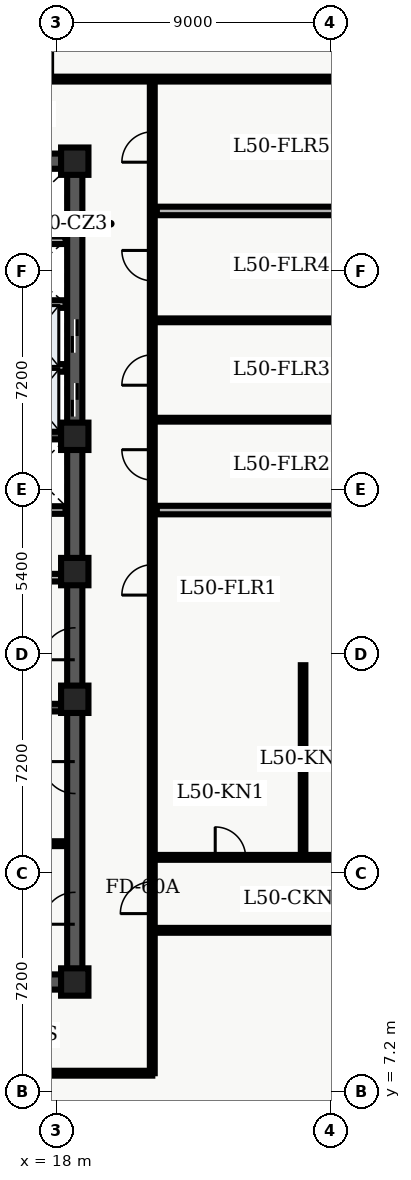
"""IFC4 building model, lengths in metres.
Left out: names, types, materials, properties, quantities, classifications, styles, units other than length and angle.
Written with IfcOpenShell. Run it as: python <this file> out.ifc"""

import sys

from ifc_helpers import new_model, entity, si_unit, converted_unit, direction, frame, origin_with_axes, origin_2d_with_axis, place, context, subcontext, project, spatial, polyline, rectangle, outline, extrude, element, fill, save


model = new_model("IFC4")
c1 = context("Model", 3, precision=1e-05, world=origin_with_axes(), true_north=direction((0.0, 1.0)))
c2 = subcontext(c1, "Body", "Model", "MODEL_VIEW")
j1 = project(units=[si_unit("LENGTHUNIT", "METRE"), converted_unit("PLANEANGLEUNIT", "DEGREE", entity("IfcPlaneAngleMeasure", 0.017), si_unit("PLANEANGLEUNIT", "RADIAN"), dimensions=[0, 0, 0, 0, 0, 0, 0])], contexts=[c1])
p1 = place(None, origin_with_axes())
s1 = spatial("IfcSite", under=j1, at=p1, CompositionType="ELEMENT")
p2 = place(p1, origin_with_axes())
s2 = spatial("IfcBuilding", under=s1, at=p2, CompositionType="ELEMENT")
p3 = place(p2, frame((0.0, 0.0, 204.3), z_axis=(0.0, 0.0, 1.0), x_axis=(1.0, 0.0, 0.0)))
s3 = spatial("IfcBuildingStorey", under=s2, at=p3, CompositionType="ELEMENT", Elevation=204.3)
p4 = place(p3, frame((11.4, 10.8, 0.0), z_axis=(0.0, 0.0, 1.0), x_axis=(1.0, 0.0, 0.0)))
e1 = element("IfcWall", 1, at=p4, inside=s3, PredefinedType="SHEAR", context=c2, shape_type="SweptSolid", body=[
    extrude(outline(polyline([(0.0, -0.25), (7.2, -0.25), (7.2, 0.25), (0.0, 0.25), (0.0, -0.25)])), origin_with_axes(), (0.0, 0.0, 1.0), 3.66),
])
p5 = place(p4, frame((2.625, 0.0, 0.0), z_axis=(0.0, 0.0, 1.0), x_axis=(1.0, 0.0, 0.0)))
e2 = element("IfcOpeningElement", 2, at=p5, cuts=e1, PredefinedType="OPENING", context=c2, shape_type="SweptSolid", body=[
    extrude(rectangle(XDim=1.05, YDim=0.52, at=origin_2d_with_axis()), origin_with_axes(), (0.0, 0.0, 1.0), 2.15),
])
p6 = place(p3, frame((11.4, 37.8, 0.0), z_axis=(0.0, 0.0, 1.0), x_axis=(1.0, 0.0, 0.0)))
e3 = element("IfcWall", 3, at=p6, inside=s3, PredefinedType="SHEAR", context=c2, shape_type="SweptSolid", body=[
    extrude(outline(polyline([(0.0, -0.25), (7.2, -0.25), (7.2, 0.25), (0.0, 0.25), (0.0, -0.25)])), origin_with_axes(), (0.0, 0.0, 1.0), 3.66),
])
p7 = place(p6, frame((2.625, 0.0, 0.0), z_axis=(0.0, 0.0, 1.0), x_axis=(1.0, 0.0, 0.0)))
e4 = element("IfcOpeningElement", 4, at=p7, cuts=e3, PredefinedType="OPENING", context=c2, shape_type="SweptSolid", body=[
    extrude(rectangle(XDim=1.05, YDim=0.52, at=origin_2d_with_axis()), origin_with_axes(), (0.0, 0.0, 1.0), 2.15),
])
p8 = place(p3, frame((18.6, 10.8, 0.0), z_axis=(0.0, 0.0, 1.0), x_axis=(0.0, 1.0, 0.0)))
e5 = element("IfcWall", 5, at=p8, inside=s3, PredefinedType="SHEAR", context=c2, shape_type="SweptSolid", body=[
    extrude(outline(polyline([(0.0, -0.25), (13.5, -0.25), (13.5, 0.25), (0.0, 0.25), (0.0, -0.25)])), origin_with_axes(), (0.0, 0.0, 1.0), 3.66),
])
p9 = place(p8, frame((11.125, 0.0, 0.0), z_axis=(0.0, 0.0, 1.0), x_axis=(1.0, 0.0, 0.0)))
e6 = element("IfcOpeningElement", 6, at=p9, cuts=e5, PredefinedType="OPENING", context=c2, shape_type="SweptSolid", body=[
    extrude(rectangle(XDim=1.05, YDim=0.52, at=origin_2d_with_axis()), origin_with_axes(), (0.0, 0.0, 1.0), 2.15),
])
p10 = place(p8, frame((2.425, 0.0, 0.0), z_axis=(0.0, 0.0, 1.0), x_axis=(1.0, 0.0, 0.0)))
e7 = element("IfcOpeningElement", 7, at=p10, cuts=e5, PredefinedType="OPENING", context=c2, shape_type="SweptSolid", body=[
    extrude(rectangle(XDim=1.05, YDim=0.52, at=origin_2d_with_axis()), origin_with_axes(), (0.0, 0.0, 1.0), 2.15),
])
p11 = place(p8, frame((6.725, 0.0, 0.0), z_axis=(0.0, 0.0, 1.0), x_axis=(1.0, 0.0, 0.0)))
e8 = element("IfcOpeningElement", 8, at=p11, cuts=e5, PredefinedType="OPENING", context=c2, shape_type="SweptSolid", body=[
    extrude(rectangle(XDim=1.05, YDim=0.52, at=origin_2d_with_axis()), origin_with_axes(), (0.0, 0.0, 1.0), 2.15),
])
p12 = place(p3, frame((18.6, 24.3, 0.0), z_axis=(0.0, 0.0, 1.0), x_axis=(0.0, 1.0, 0.0)))
e9 = element("IfcWall", 9, at=p12, inside=s3, PredefinedType="SHEAR", context=c2, shape_type="SweptSolid", body=[
    extrude(outline(polyline([(0.0, -0.25), (13.5, -0.25), (13.5, 0.25), (0.0, 0.25), (0.0, -0.25)])), origin_with_axes(), (0.0, 0.0, 1.0), 3.66),
])
p13 = place(p12, frame((5.65, 0.0, 0.0), z_axis=(0.0, 0.0, 1.0), x_axis=(1.0, 0.0, 0.0)))
e10 = element("IfcOpeningElement", 10, at=p13, cuts=e9, PredefinedType="OPENING", context=c2, shape_type="SweptSolid", body=[
    extrude(rectangle(XDim=1.1, YDim=0.52, at=origin_2d_with_axis()), origin_with_axes(), (0.0, 0.0, 1.0), 2.15),
])
p14 = place(p12, frame((7.75, 0.0, 0.0), z_axis=(0.0, 0.0, 1.0), x_axis=(1.0, 0.0, 0.0)))
e11 = element("IfcOpeningElement", 11, at=p14, cuts=e9, PredefinedType="OPENING", context=c2, shape_type="SweptSolid", body=[
    extrude(rectangle(XDim=1.1, YDim=0.52, at=origin_2d_with_axis()), origin_with_axes(), (0.0, 0.0, 1.0), 2.15),
])
for number, where, z_axis, x_axis in (
    (12, (11.65, 19.825, 0.0), (0.0, 0.0, 1.0), (1.0, 0.0, 0.0)),
    (13, (11.65, 28.775, 0.0), (0.0, 0.0, 1.0), (1.0, 0.0, 0.0)),
):
    element("IfcWall", number, at=place(p3, frame(where, z_axis=z_axis, x_axis=x_axis)), inside=s3, PredefinedType="SHEAR", context=c2, shape_type="SweptSolid", body=[
        extrude(outline(polyline([(0.0, -0.125), (6.7, -0.125), (6.7, 0.125), (0.0, 0.125), (0.0, -0.125)])), origin_with_axes(), (0.0, 0.0, 1.0), 3.66),
    ])
p15 = place(p3, frame((11.7, 24.1, 0.0), z_axis=(0.0, 0.0, 1.0), x_axis=(1.0, 0.0, 0.0)))
e14 = element("IfcWall", 14, at=p15, inside=s3, PredefinedType="SOLIDWALL", context=c2, shape_type="SweptSolid", body=[
    extrude(outline(polyline([(0.0, -0.125), (6.6, -0.125), (6.6, 0.125), (0.0, 0.125), (0.0, -0.125)])), origin_with_axes(), (0.0, 0.0, 1.0), 2.7),
])
p16 = place(p15, frame((3.6, 0.0, 0.0), z_axis=(0.0, 0.0, 1.0), x_axis=(1.0, 0.0, 0.0)))
e15 = element("IfcOpeningElement", 15, at=p16, cuts=e14, PredefinedType="OPENING", context=c2, shape_type="SweptSolid", body=[
    extrude(rectangle(XDim=0.9, YDim=0.27, at=origin_2d_with_axis()), origin_with_axes(), (0.0, 0.0, 1.0), 2.15),
])
p17 = place(p15, frame((5.65, 0.0, 0.0), z_axis=(0.0, 0.0, 1.0), x_axis=(1.0, 0.0, 0.0)))
e16 = element("IfcOpeningElement", 16, at=p17, cuts=e14, PredefinedType="OPENING", context=c2, shape_type="SweptSolid", body=[
    extrude(rectangle(XDim=0.9, YDim=0.27, at=origin_2d_with_axis()), origin_with_axes(), (0.0, 0.0, 1.0), 2.15),
])
p18 = place(p3, frame((11.7, 26.325, 0.0), z_axis=(0.0, 0.0, 1.0), x_axis=(1.0, 0.0, 0.0)))
e17 = element("IfcWall", 17, at=p18, inside=s3, PredefinedType="SOLIDWALL", context=c2, shape_type="SweptSolid", body=[
    extrude(outline(polyline([(0.0, -0.125), (6.6, -0.125), (6.6, 0.125), (0.0, 0.125), (0.0, -0.125)])), origin_with_axes(), (0.0, 0.0, 1.0), 2.7),
])
p19 = place(p18, frame((3.5, 0.0, 0.0), z_axis=(0.0, 0.0, 1.0), x_axis=(1.0, 0.0, 0.0)))
e18 = element("IfcOpeningElement", 18, at=p19, cuts=e17, PredefinedType="OPENING", context=c2, shape_type="SweptSolid", body=[
    extrude(rectangle(XDim=0.9, YDim=0.27, at=origin_2d_with_axis()), origin_with_axes(), (0.0, 0.0, 1.0), 2.15),
])
for number, where, z_axis, x_axis in (
    (19, (18.6, 10.8, 0.0), (0.0, 0.0, 1.0), (1.0, 0.0, 0.0)),
    (20, (18.6, 20.1, 0.0), (0.0, 0.0, 1.0), (1.0, 0.0, 0.0)),
    (21, (18.6, 24.3, 0.0), (0.0, 0.0, 1.0), (1.0, 0.0, 0.0)),
    (22, (18.6, 28.75, 0.0), (0.0, 0.0, 1.0), (1.0, 0.0, 0.0)),
    (23, (18.6, 37.8, 0.0), (0.0, 0.0, 1.0), (1.0, 0.0, 0.0)),
):
    element("IfcColumn", number, at=place(p3, frame(where, z_axis=z_axis, x_axis=x_axis)), inside=s3, PredefinedType="COLUMN", context=c2, shape_type="SweptSolid", body=[
        extrude(rectangle(XDim=0.9, YDim=0.9, at=origin_2d_with_axis()), origin_with_axes(), (0.0, 0.0, 1.0), 3.9),
    ])
p20 = place(p3, frame((15.84, 15.35, 0.0), z_axis=(0.0, 0.0, 1.0), x_axis=(1.0, 0.0, 0.0)))
e24 = element("IfcWall", 24, at=p20, inside=s3, PredefinedType="PARTITIONING", context=c2, shape_type="SweptSolid", body=[
    extrude(outline(polyline([(0.0, -0.08), (2.46, -0.08), (2.46, 0.08), (0.0, 0.08), (0.0, -0.08)])), origin_with_axes(), (0.0, 0.0, 1.0), 2.7),
])
for number, where, z_axis, x_axis in (
    (25, (15.84, 31.0, 0.0), (0.0, 0.0, 1.0), (1.0, 0.0, 0.0)),
    (26, (15.84, 33.1, 0.0), (0.0, 0.0, 1.0), (1.0, 0.0, 0.0)),
    (27, (15.84, 35.2, 0.0), (0.0, 0.0, 1.0), (1.0, 0.0, 0.0)),
):
    element("IfcWall", number, at=place(p3, frame(where, z_axis=z_axis, x_axis=x_axis)), inside=s3, PredefinedType="SOLIDWALL", context=c2, shape_type="SweptSolid", body=[
        extrude(outline(polyline([(0.0, -0.125), (2.46, -0.125), (2.46, 0.125), (0.0, 0.125), (0.0, -0.125)])), origin_with_axes(), (0.0, 0.0, 1.0), 2.7),
    ])
p21 = place(p3, frame((2.6, 7.8, 0.0), z_axis=(0.0, 0.0, 1.0), x_axis=(1.0, 0.0, 0.0)))
e28 = element("IfcWall", 28, at=p21, inside=s3, PredefinedType="PARTITIONING", context=c2, shape_type="SweptSolid", body=[
    extrude(outline(polyline([(0.0, -0.08), (18.55, -0.08), (18.55, 0.08), (0.0, 0.08), (0.0, -0.08)])), origin_with_axes(), (0.0, 0.0, 1.0), 2.7),
])
p22 = place(p21, frame((9.245, 0.0, 0.0), z_axis=(0.0, 0.0, 1.0), x_axis=(1.0, 0.0, 0.0)))
e29 = element("IfcOpeningElement", 29, at=p22, cuts=e28, PredefinedType="OPENING", context=c2, shape_type="SweptSolid", body=[
    extrude(rectangle(XDim=1.0, YDim=0.18, at=origin_2d_with_axis()), origin_with_axes(), (0.0, 0.0, 1.0), 2.15),
])
p23 = place(p3, frame((2.6, 40.5, 0.0), z_axis=(0.0, 0.0, 1.0), x_axis=(1.0, 0.0, 0.0)))
e30 = element("IfcWall", 30, at=p23, inside=s3, PredefinedType="PARTITIONING", context=c2, shape_type="SweptSolid", body=[
    extrude(outline(polyline([(0.0, -0.08), (26.946, -0.08), (26.946, 0.08), (0.0, 0.08), (0.0, -0.08)])), origin_with_axes(), (0.0, 0.0, 1.0), 2.7),
])
p24 = place(p23, frame((1.768, 0.0, 0.0), z_axis=(0.0, 0.0, 1.0), x_axis=(1.0, 0.0, 0.0)))
e31 = element("IfcOpeningElement", 31, at=p24, cuts=e30, PredefinedType="OPENING", context=c2, shape_type="SweptSolid", body=[
    extrude(rectangle(XDim=1.0, YDim=0.18, at=origin_2d_with_axis()), origin_with_axes(), (0.0, 0.0, 1.0), 2.15),
])
p25 = place(p23, frame((7.824, 0.0, 0.0), z_axis=(0.0, 0.0, 1.0), x_axis=(1.0, 0.0, 0.0)))
e32 = element("IfcOpeningElement", 32, at=p25, cuts=e30, PredefinedType="OPENING", context=c2, shape_type="SweptSolid", body=[
    extrude(rectangle(XDim=1.0, YDim=0.18, at=origin_2d_with_axis()), origin_with_axes(), (0.0, 0.0, 1.0), 2.15),
])
p26 = place(p23, frame((10.411, 0.0, 0.0), z_axis=(0.0, 0.0, 1.0), x_axis=(1.0, 0.0, 0.0)))
e33 = element("IfcOpeningElement", 33, at=p26, cuts=e30, PredefinedType="OPENING", context=c2, shape_type="SweptSolid", body=[
    extrude(rectangle(XDim=1.0, YDim=0.18, at=origin_2d_with_axis()), origin_with_axes(), (0.0, 0.0, 1.0), 2.15),
])
p27 = place(p23, frame((14.771, 0.0, 0.0), z_axis=(0.0, 0.0, 1.0), x_axis=(1.0, 0.0, 0.0)))
e34 = element("IfcOpeningElement", 34, at=p27, cuts=e30, PredefinedType="OPENING", context=c2, shape_type="SweptSolid", body=[
    extrude(rectangle(XDim=1.0, YDim=0.18, at=origin_2d_with_axis()), origin_with_axes(), (0.0, 0.0, 1.0), 2.15),
])
p28 = place(p3, frame((21.15, 7.8, 0.0), z_axis=(0.0, 0.0, 1.0), x_axis=(0.0, 1.0, 0.0)))
e35 = element("IfcWall", 35, at=p28, inside=s3, PredefinedType="PARTITIONING", context=c2, shape_type="SweptSolid", body=[
    extrude(outline(polyline([(0.0, -0.08), (32.7, -0.08), (32.7, 0.08), (0.0, 0.08), (0.0, -0.08)])), origin_with_axes(), (0.0, 0.0, 1.0), 2.7),
])
p29 = place(p28, frame((16.227, 0.0, 0.0), z_axis=(0.0, 0.0, 1.0), x_axis=(1.0, 0.0, 0.0)))
e36 = element("IfcOpeningElement", 36, at=p29, cuts=e35, PredefinedType="OPENING", context=c2, shape_type="SweptSolid", body=[
    extrude(rectangle(XDim=1.0, YDim=0.18, at=origin_2d_with_axis()), origin_with_axes(), (0.0, 0.0, 1.0), 2.15),
])
p30 = place(p28, frame((20.01, 0.0, 0.0), z_axis=(0.0, 0.0, 1.0), x_axis=(1.0, 0.0, 0.0)))
e37 = element("IfcOpeningElement", 37, at=p30, cuts=e35, PredefinedType="OPENING", context=c2, shape_type="SweptSolid", body=[
    extrude(rectangle(XDim=1.0, YDim=0.18, at=origin_2d_with_axis()), origin_with_axes(), (0.0, 0.0, 1.0), 2.15),
])
p31 = place(p28, frame((23.131, 0.0, 0.0), z_axis=(0.0, 0.0, 1.0), x_axis=(1.0, 0.0, 0.0)))
e38 = element("IfcOpeningElement", 38, at=p31, cuts=e35, PredefinedType="OPENING", context=c2, shape_type="SweptSolid", body=[
    extrude(rectangle(XDim=1.0, YDim=0.18, at=origin_2d_with_axis()), origin_with_axes(), (0.0, 0.0, 1.0), 2.15),
])
p32 = place(p28, frame((26.564, 0.0, 0.0), z_axis=(0.0, 0.0, 1.0), x_axis=(1.0, 0.0, 0.0)))
e39 = element("IfcOpeningElement", 39, at=p32, cuts=e35, PredefinedType="OPENING", context=c2, shape_type="SweptSolid", body=[
    extrude(rectangle(XDim=1.0, YDim=0.18, at=origin_2d_with_axis()), origin_with_axes(), (0.0, 0.0, 1.0), 2.15),
])
p33 = place(p28, frame((30.466, 0.0, 0.0), z_axis=(0.0, 0.0, 1.0), x_axis=(1.0, 0.0, 0.0)))
e40 = element("IfcOpeningElement", 40, at=p33, cuts=e35, PredefinedType="OPENING", context=c2, shape_type="SweptSolid", body=[
    extrude(rectangle(XDim=1.0, YDim=0.18, at=origin_2d_with_axis()), origin_with_axes(), (0.0, 0.0, 1.0), 2.15),
])
p34 = place(p28, frame((5.775, 0.0, 0.0), z_axis=(0.0, 0.0, 1.0), x_axis=(1.0, 0.0, 0.0)))
e41 = element("IfcOpeningElement", 41, at=p34, cuts=e35, PredefinedType="OPENING", context=c2, shape_type="SweptSolid", body=[
    extrude(rectangle(XDim=1.05, YDim=0.18, at=origin_2d_with_axis()), origin_with_axes(), (0.0, 0.0, 1.0), 2.15),
])
p35 = place(p3, frame((21.3, 26.324, 0.0), z_axis=(0.0, 0.0, 1.0), x_axis=(1.0, 0.0, 0.0)))
e42 = element("IfcWall", 42, at=p35, inside=s3, PredefinedType="PARTITIONING", context=c2, shape_type="SweptSolid", body=[
    extrude(outline(polyline([(0.0, -0.14), (8.246, -0.14), (8.246, 0.14), (0.0, 0.14), (0.0, -0.14)])), origin_with_axes(), (0.0, 0.0, 1.0), 2.7),
])
for number, where, z_axis, x_axis in (
    (43, (21.3, 29.296, 0.0), (0.0, 0.0, 1.0), (1.0, 0.0, 0.0)),
    (44, (21.3, 32.565, 0.0), (0.0, 0.0, 1.0), (1.0, 0.0, 0.0)),
):
    element("IfcWall", number, at=place(p3, frame(where, z_axis=z_axis, x_axis=x_axis)), inside=s3, PredefinedType="PARTITIONING", context=c2, shape_type="SweptSolid", body=[
        extrude(outline(polyline([(0.0, -0.062), (8.246, -0.062), (8.246, 0.062), (0.0, 0.062), (0.0, -0.062)])), origin_with_axes(), (0.0, 0.0, 1.0), 2.7),
    ])
p36 = place(p3, frame((21.3, 36.163, 0.0), z_axis=(0.0, 0.0, 1.0), x_axis=(1.0, 0.0, 0.0)))
e45 = element("IfcWall", 45, at=p36, inside=s3, PredefinedType="PARTITIONING", context=c2, shape_type="SweptSolid", body=[
    extrude(outline(polyline([(0.0, -0.14), (8.246, -0.14), (8.246, 0.14), (0.0, 0.14), (0.0, -0.14)])), origin_with_axes(), (0.0, 0.0, 1.0), 2.7),
])
p37 = place(p3, frame((21.15, 12.5, 0.0), z_axis=(0.0, 0.0, 1.0), x_axis=(1.0, 0.0, 0.0)))
e46 = element("IfcWall", 46, at=p37, inside=s3, PredefinedType="PARTITIONING", context=c2, shape_type="SweptSolid", body=[
    extrude(outline(polyline([(0.0, -0.08), (15.2, -0.08), (15.2, 0.08), (0.0, 0.08), (0.0, -0.08)])), origin_with_axes(), (0.0, 0.0, 1.0), 2.7),
])
p38 = place(p37, frame((7.65, 0.0, 0.0), z_axis=(0.0, 0.0, 1.0), x_axis=(1.0, 0.0, 0.0)))
e47 = element("IfcOpeningElement", 47, at=p38, cuts=e46, PredefinedType="OPENING", context=c2, shape_type="SweptSolid", body=[
    extrude(rectangle(XDim=1.0, YDim=0.18, at=origin_2d_with_axis()), origin_with_axes(), (0.0, 0.0, 1.0), 2.15),
])
p39 = place(p3, frame((21.15, 14.9, 0.0), z_axis=(0.0, 0.0, 1.0), x_axis=(1.0, 0.0, 0.0)))
e48 = element("IfcWall", 48, at=p39, inside=s3, PredefinedType="PARTITIONING", context=c2, shape_type="SweptSolid", body=[
    extrude(outline(polyline([(0.0, -0.08), (15.2, -0.08), (15.2, 0.08), (0.0, 0.08), (0.0, -0.08)])), origin_with_axes(), (0.0, 0.0, 1.0), 2.7),
])
p40 = place(p39, frame((2.57, 0.0, 0.0), z_axis=(0.0, 0.0, 1.0), x_axis=(1.0, 0.0, 0.0)))
e49 = element("IfcOpeningElement", 49, at=p40, cuts=e48, PredefinedType="OPENING", context=c2, shape_type="SweptSolid", body=[
    extrude(rectangle(XDim=1.0, YDim=0.18, at=origin_2d_with_axis()), origin_with_axes(), (0.0, 0.0, 1.0), 2.15),
])
p41 = place(p39, frame((6.476, 0.0, 0.0), z_axis=(0.0, 0.0, 1.0), x_axis=(1.0, 0.0, 0.0)))
e50 = element("IfcOpeningElement", 50, at=p41, cuts=e48, PredefinedType="OPENING", context=c2, shape_type="SweptSolid", body=[
    extrude(rectangle(XDim=1.0, YDim=0.18, at=origin_2d_with_axis()), origin_with_axes(), (0.0, 0.0, 1.0), 2.15),
])
p42 = place(p39, frame((9.667, 0.0, 0.0), z_axis=(0.0, 0.0, 1.0), x_axis=(1.0, 0.0, 0.0)))
e51 = element("IfcOpeningElement", 51, at=p42, cuts=e48, PredefinedType="OPENING", context=c2, shape_type="SweptSolid", body=[
    extrude(rectangle(XDim=1.0, YDim=0.18, at=origin_2d_with_axis()), origin_with_axes(), (0.0, 0.0, 1.0), 2.15),
])
p43 = place(p39, frame((13.232, 0.0, 0.0), z_axis=(0.0, 0.0, 1.0), x_axis=(1.0, 0.0, 0.0)))
e52 = element("IfcOpeningElement", 52, at=p43, cuts=e48, PredefinedType="OPENING", context=c2, shape_type="SweptSolid", body=[
    extrude(rectangle(XDim=1.0, YDim=0.18, at=origin_2d_with_axis()), origin_with_axes(), (0.0, 0.0, 1.0), 2.15),
])
p44 = place(p3, frame((26.11, 15.02, 0.0), z_axis=(0.0, 0.0, 1.0), x_axis=(0.0, 1.0, 0.0)))
e53 = element("IfcWall", 53, at=p44, inside=s3, PredefinedType="PARTITIONING", context=c2, shape_type="SweptSolid", body=[
    extrude(outline(polyline([(0.0, -0.075), (6.2, -0.075), (6.2, 0.075), (0.0, 0.075), (0.0, -0.075)])), origin_with_axes(), (0.0, 0.0, 1.0), 2.7),
])
p45 = place(p12, frame((5.65, 0.0, 0.0), z_axis=(0.0, 0.0, 1.0), x_axis=(1.0, 0.0, 0.0)))
e54 = element("IfcDoor", 54, at=p45, inside=s3, OperationType="SLIDING_TO_LEFT", PredefinedType="DOOR", context=c2, shape_type="SweptSolid", body=[
    extrude(rectangle(XDim=1.1, YDim=0.09, at=origin_2d_with_axis()), origin_with_axes(), (0.0, 0.0, 1.0), 2.15),
])
fill(e10, e54)
p46 = place(p12, frame((7.75, 0.0, 0.0), z_axis=(0.0, 0.0, 1.0), x_axis=(1.0, 0.0, 0.0)))
e55 = element("IfcDoor", 55, at=p46, inside=s3, OperationType="SLIDING_TO_RIGHT", PredefinedType="DOOR", context=c2, shape_type="SweptSolid", body=[
    extrude(rectangle(XDim=1.1, YDim=0.09, at=origin_2d_with_axis()), origin_with_axes(), (0.0, 0.0, 1.0), 2.15),
])
fill(e11, e55)
p47 = place(p8, frame((11.125, 0.0, 0.0), z_axis=(0.0, 0.0, 1.0), x_axis=(1.0, 0.0, 0.0)))
e56 = element("IfcDoor", 56, at=p47, inside=s3, OperationType="SINGLE_SWING_LEFT", PredefinedType="DOOR", context=c2, shape_type="SweptSolid", body=[
    extrude(rectangle(XDim=1.05, YDim=0.09, at=origin_2d_with_axis()), origin_with_axes(), (0.0, 0.0, 1.0), 2.15),
])
fill(e6, e56)
p48 = place(p8, frame((2.425, 0.0, 0.0), z_axis=(0.0, 0.0, 1.0), x_axis=(1.0, 0.0, 0.0)))
e57 = element("IfcDoor", 57, at=p48, inside=s3, OperationType="SINGLE_SWING_LEFT", PredefinedType="DOOR", context=c2, shape_type="SweptSolid", body=[
    extrude(rectangle(XDim=1.05, YDim=0.09, at=origin_2d_with_axis()), origin_with_axes(), (0.0, 0.0, 1.0), 2.15),
])
fill(e7, e57)
p49 = place(p8, frame((6.725, 0.0, 0.0), z_axis=(0.0, 0.0, 1.0), x_axis=(1.0, 0.0, 0.0)))
e58 = element("IfcDoor", 58, at=p49, inside=s3, OperationType="SINGLE_SWING_RIGHT", PredefinedType="DOOR", context=c2, shape_type="SweptSolid", body=[
    extrude(rectangle(XDim=1.05, YDim=0.09, at=origin_2d_with_axis()), origin_with_axes(), (0.0, 0.0, 1.0), 2.15),
])
fill(e8, e58)
p50 = place(p23, frame((14.771, 0.0, 0.0), z_axis=(0.0, 0.0, 1.0), x_axis=(1.0, 0.0, 0.0)))
e59 = element("IfcDoor", 59, at=p50, inside=s3, OperationType="SINGLE_SWING_RIGHT", PredefinedType="DOOR", context=c2, shape_type="SweptSolid", body=[
    extrude(rectangle(XDim=1.0, YDim=0.09, at=origin_2d_with_axis()), origin_with_axes(), (0.0, 0.0, 1.0), 2.15),
])
fill(e34, e59)
p51 = place(p28, frame((16.227, 0.0, 0.0), z_axis=(0.0, 0.0, 1.0), x_axis=(1.0, 0.0, 0.0)))
e60 = element("IfcDoor", 60, at=p51, inside=s3, OperationType="SINGLE_SWING_LEFT", PredefinedType="DOOR", context=c2, shape_type="SweptSolid", body=[
    extrude(rectangle(XDim=1.0, YDim=0.09, at=origin_2d_with_axis()), origin_with_axes(), (0.0, 0.0, 1.0), 2.15),
])
fill(e36, e60)
p52 = place(p28, frame((20.01, 0.0, 0.0), z_axis=(0.0, 0.0, 1.0), x_axis=(1.0, 0.0, 0.0)))
e61 = element("IfcDoor", 61, at=p52, inside=s3, OperationType="SINGLE_SWING_RIGHT", PredefinedType="DOOR", context=c2, shape_type="SweptSolid", body=[
    extrude(rectangle(XDim=1.0, YDim=0.09, at=origin_2d_with_axis()), origin_with_axes(), (0.0, 0.0, 1.0), 2.15),
])
fill(e37, e61)
p53 = place(p28, frame((23.131, 0.0, 0.0), z_axis=(0.0, 0.0, 1.0), x_axis=(1.0, 0.0, 0.0)))
e62 = element("IfcDoor", 62, at=p53, inside=s3, OperationType="SINGLE_SWING_LEFT", PredefinedType="DOOR", context=c2, shape_type="SweptSolid", body=[
    extrude(rectangle(XDim=1.0, YDim=0.09, at=origin_2d_with_axis()), origin_with_axes(), (0.0, 0.0, 1.0), 2.15),
])
fill(e38, e62)
p54 = place(p28, frame((26.564, 0.0, 0.0), z_axis=(0.0, 0.0, 1.0), x_axis=(1.0, 0.0, 0.0)))
e63 = element("IfcDoor", 63, at=p54, inside=s3, OperationType="SINGLE_SWING_RIGHT", PredefinedType="DOOR", context=c2, shape_type="SweptSolid", body=[
    extrude(rectangle(XDim=1.0, YDim=0.09, at=origin_2d_with_axis()), origin_with_axes(), (0.0, 0.0, 1.0), 2.15),
])
fill(e39, e63)
p55 = place(p28, frame((30.466, 0.0, 0.0), z_axis=(0.0, 0.0, 1.0), x_axis=(1.0, 0.0, 0.0)))
e64 = element("IfcDoor", 64, at=p55, inside=s3, OperationType="SINGLE_SWING_LEFT", PredefinedType="DOOR", context=c2, shape_type="SweptSolid", body=[
    extrude(rectangle(XDim=1.0, YDim=0.09, at=origin_2d_with_axis()), origin_with_axes(), (0.0, 0.0, 1.0), 2.15),
])
fill(e40, e64)
p56 = place(p28, frame((5.775, 0.0, 0.0), z_axis=(0.0, 0.0, 1.0), x_axis=(1.0, 0.0, 0.0)))
e65 = element("IfcDoor", 65, at=p56, inside=s3, OperationType="SINGLE_SWING_LEFT", PredefinedType="DOOR", context=c2, shape_type="SweptSolid", body=[
    extrude(rectangle(XDim=1.05, YDim=0.09, at=origin_2d_with_axis()), origin_with_axes(), (0.0, 0.0, 1.0), 2.15),
])
fill(e41, e65)
p57 = place(p39, frame((2.57, 0.0, 0.0), z_axis=(0.0, 0.0, 1.0), x_axis=(1.0, 0.0, 0.0)))
e66 = element("IfcDoor", 66, at=p57, inside=s3, OperationType="SINGLE_SWING_LEFT", PredefinedType="DOOR", context=c2, shape_type="SweptSolid", body=[
    extrude(rectangle(XDim=1.0, YDim=0.09, at=origin_2d_with_axis()), origin_with_axes(), (0.0, 0.0, 1.0), 2.15),
])
fill(e49, e66)
save(model, sys.argv[1])
